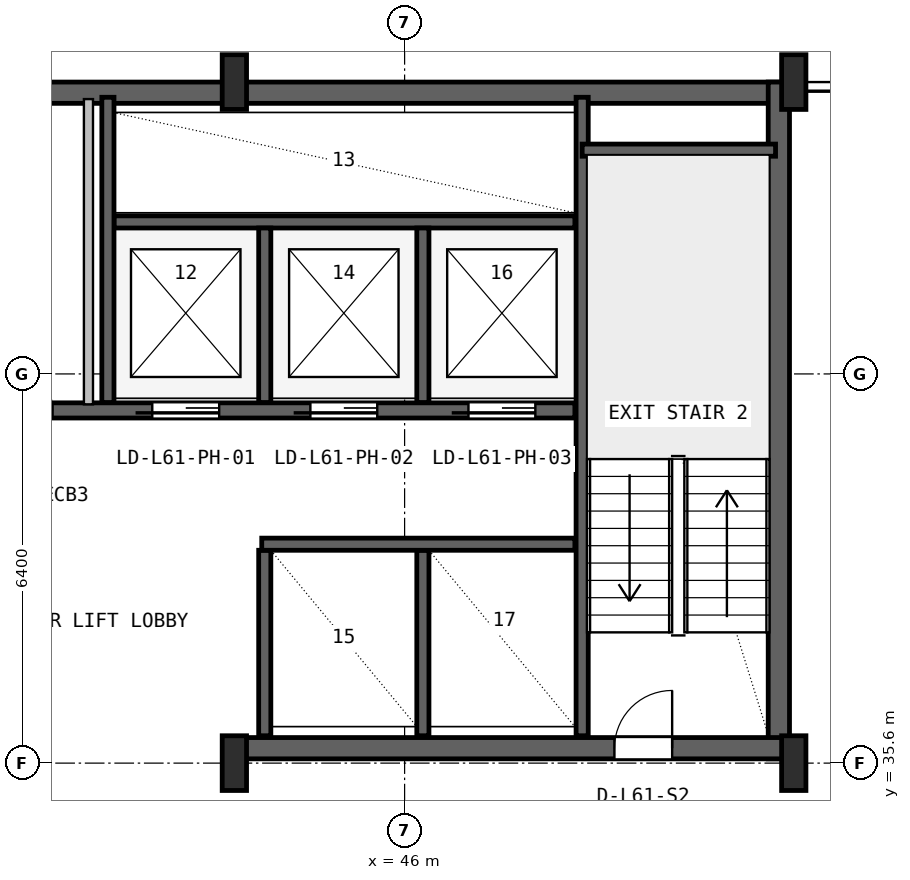
"""IFC4 building model, lengths in metres.
Left out: names, types, materials, properties, quantities, classifications, styles, units other than length and angle.
Written with IfcOpenShell. Run it as: python <this file> out.ifc"""

import sys

from ifc_helpers import new_model, si_unit, direction, frame, frame_2d, origin, origin_2d, place, context, subcontext, project, spatial, rectangle, i_section, extrude, source, transform, mapped, element, fill, save


model = new_model("IFC4")
c1 = context("Model", 3, precision=1e-05, world=origin(), true_north=direction((0.0, 1.0)))
c2 = subcontext(c1, "Body", "Model", "MODEL_VIEW")
j1 = project(units=[si_unit("LENGTHUNIT", "METRE"), si_unit("PLANEANGLEUNIT", "RADIAN")], contexts=[c1])
p1 = place(None, origin())
s1 = spatial("IfcSite", under=j1, at=p1, CompositionType="ELEMENT")
p2 = place(p1, origin())
s2 = spatial("IfcBuilding", under=s1, at=p2, CompositionType="ELEMENT")
p3 = place(p2, frame((0.0, 0.0, 247.0)))
s3 = spatial("IfcBuildingStorey", under=s2, at=p3, CompositionType="ELEMENT", Elevation=247.0)
p4 = place(p3, frame((15.6, 46.625, 0.0), z_axis=(0.0, 0.0, 1.0), x_axis=(1.0, 0.0, 0.0)))
e1 = element("IfcWall", 1, at=p4, inside=s3, PredefinedType="SHEAR", context=c2, shape_type="SweptSolid", body=[
    extrude(rectangle(XDim=36.8, YDim=0.35, at=frame_2d((18.4, 0.0))), origin(), (0.0, 0.0, 1.0), 3.55),
])
p5 = place(p3, frame((52.155, 35.67, 0.0), z_axis=(0.0, 0.0, 1.0), x_axis=(0.0, 1.0, 0.0)))
e2 = element("IfcWall", 2, at=p5, inside=s3, PredefinedType="SHEAR", context=c2, shape_type="SweptSolid", body=[
    extrude(rectangle(XDim=11.13, YDim=0.35, at=frame_2d((5.565, 0.0))), origin(), (0.0, 0.0, 1.0), 3.55),
])
p6 = place(p3, frame((43.2, 35.845, 0.0), z_axis=(0.0, 0.0, 1.0), x_axis=(1.0, 0.0, 0.0)))
e3 = element("IfcWall", 3, at=p6, inside=s3, PredefinedType="SHEAR", context=c2, shape_type="SweptSolid", body=[
    extrude(rectangle(XDim=9.13, YDim=0.35, at=frame_2d((4.565, 0.0))), origin(), (0.0, 0.0, 1.0), 3.55),
])
p7 = place(p6, frame((6.25, 0.0, 0.0)))
e4 = element("IfcOpeningElement", 4, at=p7, cuts=e3, PredefinedType="OPENING", context=c2, shape_type="SweptSolid", body=[
    extrude(rectangle(XDim=0.95, YDim=2.1, at=frame_2d((0.475, 1.05))), frame((0.0, 0.185, 0.0), z_axis=(0.0, -1.0, 0.0), x_axis=(1.0, 0.0, 0.0)), (0.0, 0.0, 1.0), 0.37),
])
m1 = source(origin(), c2, "Body", "SweptSolid", [
    extrude(i_section(OverallWidth=0.4, OverallDepth=0.9, WebThickness=0.016, FlangeThickness=0.028, FilletRadius=0.016, at=origin_2d()), origin(), (0.0, 0.0, 1.0), 3.8),
])
for number, where, z_axis, x_axis in (
    (5, (43.2, 35.6, 0.0), (0.0, 0.0, 1.0), (1.0, 0.0, 0.0)),
    (6, (43.2, 46.8, 0.0), (0.0, 0.0, 1.0), (1.0, 0.0, 0.0)),
    (7, (52.4, 35.6, 0.0), (0.0, 0.0, 1.0), (1.0, 0.0, 0.0)),
    (8, (52.4, 46.8, 0.0), (0.0, 0.0, 1.0), (1.0, 0.0, 0.0)),
):
    element("IfcColumn", number, at=place(p3, frame(where, z_axis=z_axis, x_axis=x_axis)), inside=s3, PredefinedType="COLUMN", context=c2, shape_type="MappedRepresentation", body=[
        mapped(m1, transform((0.0, 0.0, 0.0), x_axis=(1.0, 0.0, 0.0), y_axis=(0.0, 1.0, 0.0), z_axis=(0.0, 0.0, 1.0), scale=1.0)),
    ])
p8 = place(p3, frame((48.92, 36.05, 0.0), z_axis=(0.0, 0.0, 1.0), x_axis=(0.0, 1.0, 0.0)))
e9 = element("IfcWall", 9, at=p8, inside=s3, PredefinedType="SHEAR", context=c2, shape_type="SweptSolid", body=[
    extrude(rectangle(XDim=10.5, YDim=0.2, at=frame_2d((5.25, 0.0))), origin(), (0.0, 0.0, 1.0), 3.55),
])
p9 = place(p3, frame((48.92, 45.68, 0.0), z_axis=(0.0, 0.0, 1.0), x_axis=(1.0, 0.0, 0.0)))
e10 = element("IfcWall", 10, at=p9, inside=s3, PredefinedType="SHEAR", context=c2, shape_type="SweptSolid", body=[
    extrude(rectangle(XDim=3.18, YDim=0.2, at=frame_2d((1.59, 0.0))), origin(), (0.0, 0.0, 1.0), 3.55),
])
p10 = place(p3, frame((24.98, 41.4, 0.0), z_axis=(0.0, 0.0, 1.0), x_axis=(1.0, 0.0, 0.0)))
e11 = element("IfcWall", 11, at=p10, inside=s3, PredefinedType="SHEAR", context=c2, shape_type="SweptSolid", body=[
    extrude(rectangle(XDim=23.82, YDim=0.25, at=frame_2d((11.91, 0.0))), origin(), (0.0, 0.0, 1.0), 3.55),
])
p11 = place(p10, frame((16.87, 0.0, 0.0)))
e12 = element("IfcOpeningElement", 12, at=p11, cuts=e11, PredefinedType="OPENING", context=c2, shape_type="SweptSolid", body=[
    extrude(rectangle(XDim=1.1, YDim=2.18, at=frame_2d((0.55, 1.09))), frame((0.0, 0.135, 0.0), z_axis=(0.0, -1.0, 0.0), x_axis=(1.0, 0.0, 0.0)), (0.0, 0.0, 1.0), 0.27),
])
p12 = place(p10, frame((19.47, 0.0, 0.0)))
e13 = element("IfcOpeningElement", 13, at=p12, cuts=e11, PredefinedType="OPENING", context=c2, shape_type="SweptSolid", body=[
    extrude(rectangle(XDim=1.1, YDim=2.18, at=frame_2d((0.55, 1.09))), frame((0.0, 0.135, 0.0), z_axis=(0.0, -1.0, 0.0), x_axis=(1.0, 0.0, 0.0)), (0.0, 0.0, 1.0), 0.27),
])
p13 = place(p10, frame((22.07, 0.0, 0.0)))
e14 = element("IfcOpeningElement", 14, at=p13, cuts=e11, PredefinedType="OPENING", context=c2, shape_type="SweptSolid", body=[
    extrude(rectangle(XDim=1.1, YDim=2.18, at=frame_2d((0.55, 1.09))), frame((0.0, 0.135, 0.0), z_axis=(0.0, -1.0, 0.0), x_axis=(1.0, 0.0, 0.0)), (0.0, 0.0, 1.0), 0.27),
])
p14 = place(p10, frame((1.81, 0.0, 0.0)))
e15 = element("IfcOpeningElement", 15, at=p14, cuts=e11, PredefinedType="OPENING", context=c2, shape_type="SweptSolid", body=[
    extrude(rectangle(XDim=0.92, YDim=2.08, at=frame_2d((0.46, 1.04))), frame((0.0, 0.135, 0.0), z_axis=(0.0, -1.0, 0.0), x_axis=(1.0, 0.0, 0.0)), (0.0, 0.0, 1.0), 0.27),
])
p15 = place(p10, frame((5.71, 0.0, 0.0)))
e16 = element("IfcOpeningElement", 16, at=p15, cuts=e11, PredefinedType="OPENING", context=c2, shape_type="SweptSolid", body=[
    extrude(rectangle(XDim=0.92, YDim=2.08, at=frame_2d((0.46, 1.04))), frame((0.0, 0.135, 0.0), z_axis=(0.0, -1.0, 0.0), x_axis=(1.0, 0.0, 0.0)), (0.0, 0.0, 1.0), 0.27),
])
p16 = place(p10, frame((9.21, 0.0, 0.0)))
e17 = element("IfcOpeningElement", 17, at=p16, cuts=e11, PredefinedType="OPENING", context=c2, shape_type="SweptSolid", body=[
    extrude(rectangle(XDim=0.92, YDim=2.08, at=frame_2d((0.46, 1.04))), frame((0.0, 0.135, 0.0), z_axis=(0.0, -1.0, 0.0), x_axis=(1.0, 0.0, 0.0)), (0.0, 0.0, 1.0), 0.27),
])
p17 = place(p10, frame((11.96, 0.0, 0.0)))
e18 = element("IfcOpeningElement", 18, at=p17, cuts=e11, PredefinedType="OPENING", context=c2, shape_type="SweptSolid", body=[
    extrude(rectangle(XDim=0.92, YDim=2.08, at=frame_2d((0.46, 1.04))), frame((0.0, 0.135, 0.0), z_axis=(0.0, -1.0, 0.0), x_axis=(1.0, 0.0, 0.0)), (0.0, 0.0, 1.0), 0.27),
])
p18 = place(p10, frame((14.31, 0.0, 0.0)))
e19 = element("IfcOpeningElement", 19, at=p18, cuts=e11, PredefinedType="OPENING", context=c2, shape_type="SweptSolid", body=[
    extrude(rectangle(XDim=0.92, YDim=2.08, at=frame_2d((0.46, 1.04))), frame((0.0, 0.135, 0.0), z_axis=(0.0, -1.0, 0.0), x_axis=(1.0, 0.0, 0.0)), (0.0, 0.0, 1.0), 0.27),
])
p19 = place(p3, frame((41.22, 44.5, 0.0), z_axis=(0.0, 0.0, 1.0), x_axis=(1.0, 0.0, 0.0)))
e20 = element("IfcWall", 20, at=p19, inside=s3, PredefinedType="SHEAR", context=c2, shape_type="SweptSolid", body=[
    extrude(rectangle(XDim=7.58, YDim=0.2, at=frame_2d((3.79, 0.0))), origin(), (0.0, 0.0, 1.0), 3.55),
])
p20 = place(p3, frame((41.12, 41.53, 0.0), z_axis=(0.0, 0.0, 1.0), x_axis=(0.0, 1.0, 0.0)))
e21 = element("IfcWall", 21, at=p20, inside=s3, PredefinedType="SHEAR", context=c2, shape_type="SweptSolid", body=[
    extrude(rectangle(XDim=5.02, YDim=0.2, at=frame_2d((2.51, 0.0))), origin(), (0.0, 0.0, 1.0), 3.55),
])
for number, where, z_axis, x_axis in (
    (22, (43.7, 41.53, 0.0), (0.0, 0.0, 1.0), (0.0, 1.0, 0.0)),
    (23, (46.3, 41.53, 0.0), (0.0, 0.0, 1.0), (0.0, 1.0, 0.0)),
):
    element("IfcWall", number, at=place(p3, frame(where, z_axis=z_axis, x_axis=x_axis)), inside=s3, PredefinedType="SHEAR", context=c2, shape_type="SweptSolid", body=[
        extrude(rectangle(XDim=2.87, YDim=0.2, at=frame_2d((1.435, 0.0))), origin(), (0.0, 0.0, 1.0), 3.55),
    ])
for number, where, z_axis, x_axis in (
    (24, (43.7, 36.05, 0.0), (0.0, 0.0, 1.0), (0.0, 1.0, 0.0)),
    (25, (46.3, 36.05, 0.0), (0.0, 0.0, 1.0), (0.0, 1.0, 0.0)),
):
    element("IfcWall", number, at=place(p3, frame(where, z_axis=z_axis, x_axis=x_axis)), inside=s3, PredefinedType="SHEAR", context=c2, shape_type="SweptSolid", body=[
        extrude(rectangle(XDim=3.05, YDim=0.2, at=frame_2d((1.525, 0.0))), origin(), (0.0, 0.0, 1.0), 3.55),
    ])
p21 = place(p3, frame((43.65, 39.2, 0.0), z_axis=(0.0, 0.0, 1.0), x_axis=(1.0, 0.0, 0.0)))
e26 = element("IfcWall", 26, at=p21, inside=s3, PredefinedType="SHEAR", context=c2, shape_type="SweptSolid", body=[
    extrude(rectangle(XDim=5.15, YDim=0.2, at=frame_2d((2.575, 0.0))), origin(), (0.0, 0.0, 1.0), 3.55),
])
p22 = place(p3, frame((40.8, 41.5, 0.0), z_axis=(0.0, 0.0, 1.0), x_axis=(0.0, 1.0, 0.0)))
e27 = element("IfcWall", 27, at=p22, inside=s3, PredefinedType="PARTITIONING", context=c2, shape_type="SweptSolid", body=[
    extrude(rectangle(XDim=5.02, YDim=0.15, at=frame_2d((2.51, 0.0))), origin(), (0.0, 0.0, 1.0), 3.53),
])
m2 = source(origin(), c2, "Body", "SweptSolid", [
    extrude(rectangle(XDim=0.95, YDim=2.1, at=frame_2d((0.475, 1.05))), frame((0.0, 0.025, 0.0), z_axis=(0.0, -1.0, 0.0), x_axis=(1.0, 0.0, 0.0)), (0.0, 0.0, 1.0), 0.05),
])
p23 = place(p7, origin())
e28 = element("IfcDoor", 28, at=p23, inside=s3, OperationType="SINGLE_SWING_RIGHT", PredefinedType="DOOR", context=c2, shape_type="MappedRepresentation", body=[
    mapped(m2, transform((0.0, 0.0, 0.0), x_axis=(1.0, 0.0, 0.0), y_axis=(0.0, 1.0, 0.0), z_axis=(0.0, 0.0, 1.0), scale=1.0)),
])
fill(e4, e28)
m3 = source(origin(), c2, "Body", "SweptSolid", [
    extrude(rectangle(XDim=1.1, YDim=2.18, at=frame_2d((0.55, 1.09))), frame((0.0, 0.025, 0.0), z_axis=(0.0, -1.0, 0.0), x_axis=(1.0, 0.0, 0.0)), (0.0, 0.0, 1.0), 0.05),
])
p24 = place(p11, frame((1.1, 0.0, 0.0), z_axis=(0.0, 0.0, 1.0), x_axis=(-1.0, 0.0, 0.0)))
e29 = element("IfcDoor", 29, at=p24, inside=s3, OperationType="SLIDING_TO_LEFT", PredefinedType="DOOR", context=c2, shape_type="MappedRepresentation", body=[
    mapped(m3, transform((0.0, 0.0, 0.0), x_axis=(1.0, 0.0, 0.0), y_axis=(0.0, 1.0, 0.0), z_axis=(0.0, 0.0, 1.0), scale=1.0)),
])
fill(e12, e29)
p25 = place(p12, frame((1.1, 0.0, 0.0), z_axis=(0.0, 0.0, 1.0), x_axis=(-1.0, 0.0, 0.0)))
e30 = element("IfcDoor", 30, at=p25, inside=s3, OperationType="SLIDING_TO_LEFT", PredefinedType="DOOR", context=c2, shape_type="MappedRepresentation", body=[
    mapped(m3, transform((0.0, 0.0, 0.0), x_axis=(1.0, 0.0, 0.0), y_axis=(0.0, 1.0, 0.0), z_axis=(0.0, 0.0, 1.0), scale=1.0)),
])
fill(e13, e30)
p26 = place(p13, frame((1.1, 0.0, 0.0), z_axis=(0.0, 0.0, 1.0), x_axis=(-1.0, 0.0, 0.0)))
e31 = element("IfcDoor", 31, at=p26, inside=s3, OperationType="SLIDING_TO_LEFT", PredefinedType="DOOR", context=c2, shape_type="MappedRepresentation", body=[
    mapped(m3, transform((0.0, 0.0, 0.0), x_axis=(1.0, 0.0, 0.0), y_axis=(0.0, 1.0, 0.0), z_axis=(0.0, 0.0, 1.0), scale=1.0)),
])
fill(e14, e31)
m4 = source(origin(), c2, "Body", "SweptSolid", [
    extrude(rectangle(XDim=0.92, YDim=2.08, at=frame_2d((0.46, 1.04))), frame((0.0, 0.025, 0.0), z_axis=(0.0, -1.0, 0.0), x_axis=(1.0, 0.0, 0.0)), (0.0, 0.0, 1.0), 0.05),
])
p27 = place(p18, origin())
e32 = element("IfcDoor", 32, at=p27, inside=s3, OperationType="SINGLE_SWING_LEFT", PredefinedType="DOOR", context=c2, shape_type="MappedRepresentation", body=[
    mapped(m4, transform((0.0, 0.0, 0.0), x_axis=(1.0, 0.0, 0.0), y_axis=(0.0, 1.0, 0.0), z_axis=(0.0, 0.0, 1.0), scale=1.0)),
])
fill(e19, e32)
save(model, sys.argv[1])
